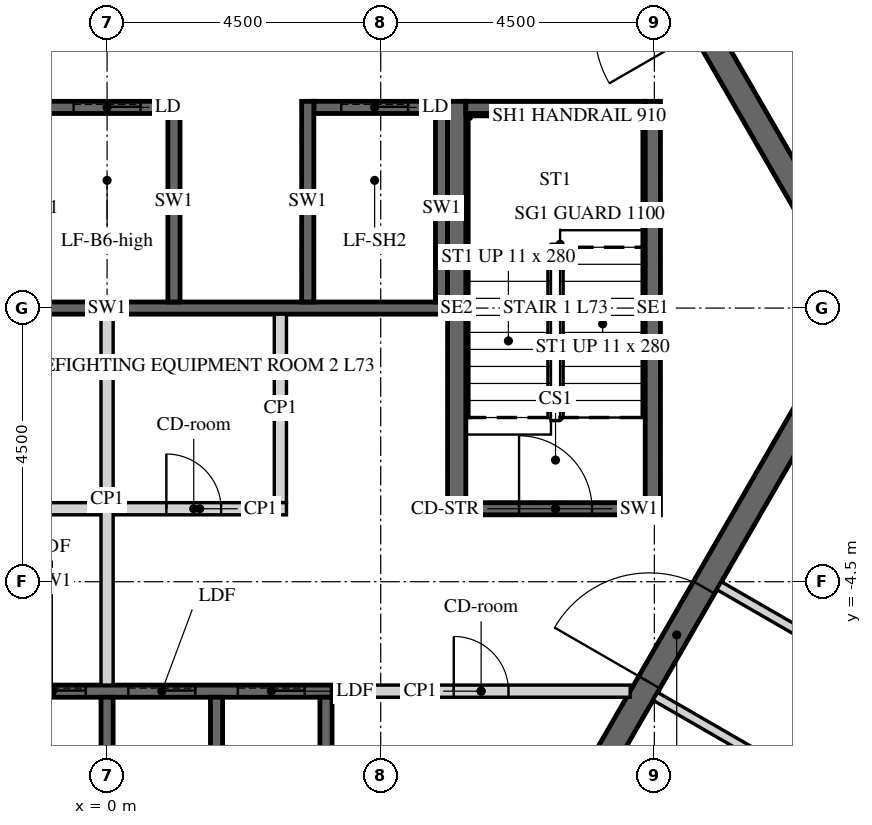
"""IFC4 building model, lengths in metres.
Left out: names, types, materials, properties, quantities, classifications, styles, units other than length and angle.
Written with IfcOpenShell. Run it as: python <this file> out.ifc"""

import sys

from ifc_helpers import new_model, si_unit, direction, frame, frame_2d, origin, place, context, subcontext, project, spatial, polyline, rectangle, outline, extrude, element, fill, save


model = new_model("IFC4")
c1 = context("Model", 3, precision=1e-05, world=origin(), true_north=direction((0.0, 1.0)))
c2 = subcontext(c1, "Body", "Model", "MODEL_VIEW")
j1 = project(units=[si_unit("LENGTHUNIT", "METRE"), si_unit("PLANEANGLEUNIT", "RADIAN")], contexts=[c1])
p1 = place(None, origin())
s1 = spatial("IfcSite", under=j1, at=p1, CompositionType="ELEMENT")
p2 = place(p1, origin())
s2 = spatial("IfcBuilding", under=s1, at=p2, CompositionType="ELEMENT")
p3 = place(p2, frame((0.0, 0.0, 303.0)))
s3 = spatial("IfcBuildingStorey", under=s2, at=p3, CompositionType="ELEMENT", Elevation=303.0)
p4 = place(p3, frame((6.235, -10.8, -0.15), z_axis=(0.0, 0.0, 1.0), x_axis=(0.499996419489, 0.866027470984, 0.0)))
e1 = element("IfcWall", 1, at=p4, inside=s3, PredefinedType="SHEAR", context=c2, shape_type="SweptSolid", body=[
    extrude(outline(polyline([(-0.115, -0.2), (12.586, -0.2), (12.355, 0.2), (0.115, 0.2), (-0.115, -0.2)])), origin(), (0.0, 0.0, 1.0), 3.9),
])
p5 = place(p4, frame((5.364, 0.0, 0.15)))
e2 = element("IfcOpeningElement", 2, at=p5, cuts=e1, PredefinedType="OPENING", context=c2, shape_type="SweptSolid", body=[
    extrude(rectangle(XDim=1.8, YDim=2.4, at=frame_2d((0.9, 1.2))), frame((0.0, 0.21, 0.0), z_axis=(0.0, -1.0, 0.0), x_axis=(1.0, 0.0, 0.0)), (0.0, 0.0, 1.0), 0.42),
])
p6 = place(p3, frame((12.471, 0.0, -0.15), z_axis=(0.0, 0.0, 1.0), x_axis=(-0.499996419489, 0.866027470984, 0.0)))
e3 = element("IfcWall", 3, at=p6, inside=s3, PredefinedType="SHEAR", context=c2, shape_type="SweptSolid", body=[
    extrude(outline(polyline([(-0.115, -0.2), (12.586, -0.2), (12.355, 0.2), (0.115, 0.2), (-0.115, -0.2)])), origin(), (0.0, 0.0, 1.0), 3.9),
])
p7 = place(p6, frame((5.306, 0.0, 0.15)))
e4 = element("IfcOpeningElement", 4, at=p7, cuts=e3, PredefinedType="OPENING", context=c2, shape_type="SweptSolid", body=[
    extrude(rectangle(XDim=1.8, YDim=2.4, at=frame_2d((0.9, 1.2))), frame((0.0, 0.21, 0.0), z_axis=(0.0, -1.0, 0.0), x_axis=(1.0, 0.0, 0.0)), (0.0, 0.0, 1.0), 0.42),
])
p8 = place(p3, frame((-5.6, 3.3, -0.25), z_axis=(0.0, 0.0, 1.0), x_axis=(1.0, 0.0, 0.0)))
e5 = element("IfcWall", 5, at=p8, inside=s3, PredefinedType="SHEAR", context=c2, shape_type="SweptSolid", body=[
    extrude(rectangle(XDim=6.6, YDim=0.2, at=frame_2d((3.3, 0.0))), origin(), (0.0, 0.0, 1.0), 3.9),
])
p9 = place(p8, frame((0.65, 0.0, 0.25)))
e6 = element("IfcOpeningElement", 6, at=p9, cuts=e5, PredefinedType="OPENING", context=c2, shape_type="SweptSolid", body=[
    extrude(rectangle(XDim=1.1, YDim=2.1, at=frame_2d((0.55, 1.05))), frame((0.0, 0.11, 0.0), z_axis=(0.0, -1.0, 0.0), x_axis=(1.0, 0.0, 0.0)), (0.0, 0.0, 1.0), 0.22),
])
p10 = place(p8, frame((2.85, 0.0, 0.25)))
e7 = element("IfcOpeningElement", 7, at=p10, cuts=e5, PredefinedType="OPENING", context=c2, shape_type="SweptSolid", body=[
    extrude(rectangle(XDim=1.1, YDim=2.1, at=frame_2d((0.55, 1.05))), frame((0.0, 0.11, 0.0), z_axis=(0.0, -1.0, 0.0), x_axis=(1.0, 0.0, 0.0)), (0.0, 0.0, 1.0), 0.22),
])
p11 = place(p8, frame((5.05, 0.0, 0.25)))
e8 = element("IfcOpeningElement", 8, at=p11, cuts=e5, PredefinedType="OPENING", context=c2, shape_type="SweptSolid", body=[
    extrude(rectangle(XDim=1.1, YDim=2.1, at=frame_2d((0.55, 1.05))), frame((0.0, 0.11, 0.0), z_axis=(0.0, -1.0, 0.0), x_axis=(1.0, 0.0, 0.0)), (0.0, 0.0, 1.0), 0.22),
])
p12 = place(p3, frame((3.4, 3.3, -0.25), z_axis=(0.0, 0.0, 1.0), x_axis=(1.0, 0.0, 0.0)))
e9 = element("IfcWall", 9, at=p12, inside=s3, PredefinedType="SHEAR", context=c2, shape_type="SweptSolid", body=[
    extrude(rectangle(XDim=2.2, YDim=0.2, at=frame_2d((1.1, 0.0))), origin(), (0.0, 0.0, 1.0), 3.9),
])
p13 = place(p12, frame((0.45, 0.0, 0.25)))
e10 = element("IfcOpeningElement", 10, at=p13, cuts=e9, PredefinedType="OPENING", context=c2, shape_type="SweptSolid", body=[
    extrude(rectangle(XDim=1.1, YDim=2.1, at=frame_2d((0.55, 1.05))), frame((0.0, 0.11, 0.0), z_axis=(0.0, -1.0, 0.0), x_axis=(1.0, 0.0, 0.0)), (0.0, 0.0, 1.0), 0.22),
])
p14 = place(p3, frame((-5.6, 0.0, -0.25), z_axis=(0.0, 0.0, 1.0), x_axis=(1.0, 0.0, 0.0)))
e11 = element("IfcWall", 11, at=p14, inside=s3, PredefinedType="SHEAR", context=c2, shape_type="SweptSolid", body=[
    extrude(rectangle(XDim=11.2, YDim=0.2, at=frame_2d((5.6, 0.0))), origin(), (0.0, 0.0, 1.0), 3.9),
])
for number, where, z_axis, x_axis in (
    (12, (1.1, 0.1, -0.25), (0.0, 0.0, 1.0), (0.0, 1.0, 0.0)),
    (13, (3.3, 0.1, -0.25), (0.0, 0.0, 1.0), (0.0, 1.0, 0.0)),
):
    element("IfcWall", number, at=place(p3, frame(where, z_axis=z_axis, x_axis=x_axis)), inside=s3, PredefinedType="SHEAR", context=c2, shape_type="SweptSolid", body=[
        extrude(rectangle(XDim=3.3, YDim=0.2, at=frame_2d((1.65, 0.0))), origin(), (0.0, 0.0, 1.0), 3.9),
    ])
p15 = place(p3, frame((5.5, 0.1, -0.25), z_axis=(0.0, 0.0, 1.0), x_axis=(0.0, 1.0, 0.0)))
e14 = element("IfcWall", 14, at=p15, inside=s3, PredefinedType="SHEAR", context=c2, shape_type="SweptSolid", body=[
    extrude(rectangle(XDim=3.1, YDim=0.2, at=frame_2d((1.55, 0.0))), origin(), (0.0, 0.0, 1.0), 3.9),
])
p16 = place(p3, frame((-5.5, -6.3, -0.25), z_axis=(0.0, 0.0, 1.0), x_axis=(1.0, 0.0, 0.0)))
e15 = element("IfcWall", 15, at=p16, inside=s3, PredefinedType="SHEAR", context=c2, shape_type="SweptSolid", body=[
    extrude(rectangle(XDim=9.2, YDim=0.2, at=frame_2d((4.6, 0.0))), origin(), (0.0, 0.0, 1.0), 3.9),
])
p17 = place(p16, frame((0.45, 0.0, 0.25)))
e16 = element("IfcOpeningElement", 16, at=p17, cuts=e15, PredefinedType="OPENING", context=c2, shape_type="SweptSolid", body=[
    extrude(rectangle(XDim=1.1, YDim=2.1, at=frame_2d((0.55, 1.05))), frame((0.0, 0.11, 0.0), z_axis=(0.0, -1.0, 0.0), x_axis=(1.0, 0.0, 0.0)), (0.0, 0.0, 1.0), 0.22),
])
p18 = place(p16, frame((2.25, 0.0, 0.25)))
e17 = element("IfcOpeningElement", 17, at=p18, cuts=e15, PredefinedType="OPENING", context=c2, shape_type="SweptSolid", body=[
    extrude(rectangle(XDim=1.1, YDim=2.1, at=frame_2d((0.55, 1.05))), frame((0.0, 0.11, 0.0), z_axis=(0.0, -1.0, 0.0), x_axis=(1.0, 0.0, 0.0)), (0.0, 0.0, 1.0), 0.22),
])
p19 = place(p16, frame((4.05, 0.0, 0.25)))
e18 = element("IfcOpeningElement", 18, at=p19, cuts=e15, PredefinedType="OPENING", context=c2, shape_type="SweptSolid", body=[
    extrude(rectangle(XDim=1.1, YDim=2.1, at=frame_2d((0.55, 1.05))), frame((0.0, 0.11, 0.0), z_axis=(0.0, -1.0, 0.0), x_axis=(1.0, 0.0, 0.0)), (0.0, 0.0, 1.0), 0.22),
])
p20 = place(p16, frame((5.85, 0.0, 0.25)))
e19 = element("IfcOpeningElement", 19, at=p20, cuts=e15, PredefinedType="OPENING", context=c2, shape_type="SweptSolid", body=[
    extrude(rectangle(XDim=1.1, YDim=2.1, at=frame_2d((0.55, 1.05))), frame((0.0, 0.11, 0.0), z_axis=(0.0, -1.0, 0.0), x_axis=(1.0, 0.0, 0.0)), (0.0, 0.0, 1.0), 0.22),
])
p21 = place(p16, frame((7.65, 0.0, 0.25)))
e20 = element("IfcOpeningElement", 20, at=p21, cuts=e15, PredefinedType="OPENING", context=c2, shape_type="SweptSolid", body=[
    extrude(rectangle(XDim=1.1, YDim=2.1, at=frame_2d((0.55, 1.05))), frame((0.0, 0.11, 0.0), z_axis=(0.0, -1.0, 0.0), x_axis=(1.0, 0.0, 0.0)), (0.0, 0.0, 1.0), 0.22),
])
for number, where, z_axis, x_axis in (
    (21, (0.0, -9.3, -0.25), (0.0, 0.0, 1.0), (0.0, 1.0, 0.0)),
    (22, (1.8, -9.3, -0.25), (0.0, 0.0, 1.0), (0.0, 1.0, 0.0)),
    (23, (3.6, -9.3, -0.25), (0.0, 0.0, 1.0), (0.0, 1.0, 0.0)),
):
    element("IfcWall", number, at=place(p3, frame(where, z_axis=z_axis, x_axis=x_axis)), inside=s3, PredefinedType="SHEAR", context=c2, shape_type="SweptSolid", body=[
        extrude(rectangle(XDim=2.9, YDim=0.2, at=frame_2d((1.45, 0.0))), origin(), (0.0, 0.0, 1.0), 3.9),
    ])
p22 = place(p3, frame((-5.6, -3.3, 0.0), z_axis=(0.0, 0.0, 1.0), x_axis=(1.0, 0.0, 0.0)))
e24 = element("IfcWall", 24, at=p22, inside=s3, PredefinedType="PARTITIONING", context=c2, shape_type="SweptSolid", body=[
    extrude(rectangle(XDim=5.5, YDim=0.2, at=frame_2d((2.75, 0.0))), origin(), (0.0, 0.0, 1.0), 3.65),
])
p23 = place(p22, frame((2.3, 0.0, 0.0)))
e25 = element("IfcOpeningElement", 25, at=p23, cuts=e24, PredefinedType="OPENING", context=c2, shape_type="SweptSolid", body=[
    extrude(rectangle(XDim=0.9, YDim=2.1, at=frame_2d((0.45, 1.05))), frame((0.0, 0.11, 0.0), z_axis=(0.0, -1.0, 0.0), x_axis=(1.0, 0.0, 0.0)), (0.0, 0.0, 1.0), 0.22),
])
p24 = place(p3, frame((0.1, -3.3, 0.0), z_axis=(0.0, 0.0, 1.0), x_axis=(1.0, 0.0, 0.0)))
e26 = element("IfcWall", 26, at=p24, inside=s3, PredefinedType="PARTITIONING", context=c2, shape_type="SweptSolid", body=[
    extrude(rectangle(XDim=2.85, YDim=0.2, at=frame_2d((1.425, 0.0))), origin(), (0.0, 0.0, 1.0), 3.65),
])
p25 = place(p24, frame((0.875, 0.0, 0.0)))
e27 = element("IfcOpeningElement", 27, at=p25, cuts=e26, PredefinedType="OPENING", context=c2, shape_type="SweptSolid", body=[
    extrude(rectangle(XDim=0.9, YDim=2.1, at=frame_2d((0.45, 1.05))), frame((0.0, 0.11, 0.0), z_axis=(0.0, -1.0, 0.0), x_axis=(1.0, 0.0, 0.0)), (0.0, 0.0, 1.0), 0.22),
])
p26 = place(p3, frame((2.85, -3.2, 0.0), z_axis=(0.0, 0.0, 1.0), x_axis=(0.0, 1.0, 0.0)))
e28 = element("IfcWall", 28, at=p26, inside=s3, PredefinedType="PARTITIONING", context=c2, shape_type="SweptSolid", body=[
    extrude(rectangle(XDim=3.1, YDim=0.2, at=frame_2d((1.55, 0.0))), origin(), (0.0, 0.0, 1.0), 3.65),
])
p27 = place(p3, frame((0.0, -6.2, 0.0), z_axis=(0.0, 0.0, 1.0), x_axis=(0.0, 1.0, 0.0)))
e29 = element("IfcWall", 29, at=p27, inside=s3, PredefinedType="PARTITIONING", context=c2, shape_type="SweptSolid", body=[
    extrude(rectangle(XDim=6.1, YDim=0.2, at=frame_2d((3.05, 0.0))), origin(), (0.0, 0.0, 1.0), 3.65),
])
p28 = place(p3, frame((3.7, -6.3, 0.0), z_axis=(0.0, 0.0, 1.0), x_axis=(1.0, 0.0, 0.0)))
e30 = element("IfcWall", 30, at=p28, inside=s3, PredefinedType="PARTITIONING", context=c2, shape_type="SweptSolid", body=[
    extrude(rectangle(XDim=4.903, YDim=0.2, at=frame_2d((2.451, 0.0))), origin(), (0.0, 0.0, 1.0), 3.65),
])
p29 = place(p28, frame((2.001, 0.0, 0.0)))
e31 = element("IfcOpeningElement", 31, at=p29, cuts=e30, PredefinedType="OPENING", context=c2, shape_type="SweptSolid", body=[
    extrude(rectangle(XDim=0.9, YDim=2.1, at=frame_2d((0.45, 1.05))), frame((0.0, 0.11, 0.0), z_axis=(0.0, -1.0, 0.0), x_axis=(1.0, 0.0, 0.0)), (0.0, 0.0, 1.0), 0.22),
])
p30 = place(p3, frame((5.75, -3.4, -0.25), z_axis=(0.0, 0.0, 1.0), x_axis=(0.0, 1.0, 0.0)))
e32 = element("IfcWall", 32, at=p30, inside=s3, PredefinedType="SHEAR", context=c2, shape_type="SweptSolid", body=[
    extrude(rectangle(XDim=6.8, YDim=0.3, at=frame_2d((3.4, 0.0))), origin(), (0.0, 0.0, 1.0), 3.9),
])
p31 = place(p3, frame((8.975, -3.4, -0.25), z_axis=(0.0, 0.0, 1.0), x_axis=(0.0, 1.0, 0.0)))
e33 = element("IfcWall", 33, at=p31, inside=s3, PredefinedType="SHEAR", context=c2, shape_type="SweptSolid", body=[
    extrude(rectangle(XDim=6.8, YDim=0.25, at=frame_2d((3.4, 0.0))), origin(), (0.0, 0.0, 1.0), 3.9),
])
p32 = place(p3, frame((5.9, 3.3, -0.25), z_axis=(0.0, 0.0, 1.0), x_axis=(1.0, 0.0, 0.0)))
e34 = element("IfcWall", 34, at=p32, inside=s3, PredefinedType="SHEAR", context=c2, shape_type="SweptSolid", body=[
    extrude(rectangle(XDim=2.95, YDim=0.2, at=frame_2d((1.475, 0.0))), origin(), (0.0, 0.0, 1.0), 3.9),
])
p33 = place(p3, frame((5.9, -3.3, -0.25), z_axis=(0.0, 0.0, 1.0), x_axis=(1.0, 0.0, 0.0)))
e35 = element("IfcWall", 35, at=p33, inside=s3, PredefinedType="SHEAR", context=c2, shape_type="SweptSolid", body=[
    extrude(rectangle(XDim=2.95, YDim=0.2, at=frame_2d((1.475, 0.0))), origin(), (0.0, 0.0, 1.0), 3.9),
])
p34 = place(p33, frame((0.875, 0.0, 0.25)))
e36 = element("IfcOpeningElement", 36, at=p34, cuts=e35, PredefinedType="OPENING", context=c2, shape_type="SweptSolid", body=[
    extrude(rectangle(XDim=1.2, YDim=2.4, at=frame_2d((0.6, 1.2))), frame((0.0, 0.11, 0.0), z_axis=(0.0, -1.0, 0.0), x_axis=(1.0, 0.0, 0.0)), (0.0, 0.0, 1.0), 0.22),
])
p35 = place(p3, frame((18.875, -1.158, 0.0), z_axis=(0.0, 0.0, 1.0), x_axis=(-0.55919880344, 0.829033592945, 0.0)))
e37 = element("IfcWall", 37, at=p35, inside=s3, PredefinedType="PARTITIONING", context=c2, shape_type="SweptSolid", body=[
    extrude(rectangle(XDim=16.939, YDim=0.15, at=frame_2d((8.47, 0.0))), origin(), (0.0, 0.0, 1.0), 2.988),
])
p36 = place(p35, frame((4.09, 0.0, 0.0)))
e38 = element("IfcOpeningElement", 38, at=p36, cuts=e37, PredefinedType="OPENING", context=c2, shape_type="SweptSolid", body=[
    extrude(rectangle(XDim=1.0, YDim=2.1, at=frame_2d((0.5, 1.05))), frame((0.0, 0.085, 0.0), z_axis=(0.0, -1.0, 0.0), x_axis=(1.0, 0.0, 0.0)), (0.0, 0.0, 1.0), 0.17),
])
p37 = place(p35, frame((15.39, 0.0, 0.0)))
e39 = element("IfcOpeningElement", 39, at=p37, cuts=e37, PredefinedType="OPENING", context=c2, shape_type="SweptSolid", body=[
    extrude(rectangle(XDim=1.0, YDim=2.1, at=frame_2d((0.5, 1.05))), frame((0.0, 0.085, 0.0), z_axis=(0.0, -1.0, 0.0), x_axis=(1.0, 0.0, 0.0)), (0.0, 0.0, 1.0), 0.17),
])
p38 = place(p3, frame((13.898, -6.778, 0.0), z_axis=(0.0, 0.0, 1.0), x_axis=(-0.866041342403, 0.499972392486, 0.0)))
e40 = element("IfcWall", 40, at=p38, inside=s3, PredefinedType="PARTITIONING", context=c2, shape_type="SweptSolid", body=[
    extrude(rectangle(XDim=4.425, YDim=0.15, at=frame_2d((2.212, 0.0))), origin(), (0.0, 0.0, 1.0), 2.988),
])
p39 = place(p3, frame((9.016, -6.384, 0.0), z_axis=(0.0, 0.0, 1.0), x_axis=(0.866031096941, -0.499990139034, 0.0)))
e41 = element("IfcWall", 41, at=p39, inside=s3, PredefinedType="PARTITIONING", context=c2, shape_type="SweptSolid", body=[
    extrude(rectangle(XDim=4.5, YDim=0.15, at=frame_2d((2.25, 0.0))), origin(), (0.0, 0.0, 1.0), 2.988),
])
p40 = place(p5, origin())
e42 = element("IfcDoor", 42, at=p40, inside=s3, OperationType="DOUBLE_DOOR_SINGLE_SWING", PredefinedType="DOOR", context=c2, shape_type="SweptSolid", body=[
    extrude(rectangle(XDim=1.8, YDim=2.4, at=frame_2d((0.9, 1.2))), frame((0.0, 0.025, 0.0), z_axis=(0.0, -1.0, 0.0), x_axis=(1.0, 0.0, 0.0)), (0.0, 0.0, 1.0), 0.05),
])
fill(e2, e42)
p41 = place(p25, origin())
e43 = element("IfcDoor", 43, at=p41, inside=s3, OperationType="SINGLE_SWING_LEFT", PredefinedType="DOOR", context=c2, shape_type="SweptSolid", body=[
    extrude(rectangle(XDim=0.9, YDim=2.1, at=frame_2d((0.45, 1.05))), frame((0.0, 0.025, 0.0), z_axis=(0.0, -1.0, 0.0), x_axis=(1.0, 0.0, 0.0)), (0.0, 0.0, 1.0), 0.05),
])
fill(e27, e43)
p42 = place(p29, origin())
e44 = element("IfcDoor", 44, at=p42, inside=s3, OperationType="SINGLE_SWING_LEFT", PredefinedType="DOOR", context=c2, shape_type="SweptSolid", body=[
    extrude(rectangle(XDim=0.9, YDim=2.1, at=frame_2d((0.45, 1.05))), frame((0.0, 0.025, 0.0), z_axis=(0.0, -1.0, 0.0), x_axis=(1.0, 0.0, 0.0)), (0.0, 0.0, 1.0), 0.05),
])
fill(e31, e44)
p43 = place(p34, origin())
e45 = element("IfcDoor", 45, at=p43, inside=s3, OperationType="SINGLE_SWING_LEFT", PredefinedType="DOOR", context=c2, shape_type="SweptSolid", body=[
    extrude(rectangle(XDim=1.2, YDim=2.4, at=frame_2d((0.6, 1.2))), frame((0.0, 0.025, 0.0), z_axis=(0.0, -1.0, 0.0), x_axis=(1.0, 0.0, 0.0)), (0.0, 0.0, 1.0), 0.05),
])
fill(e36, e45)
p44 = place(p11, origin())
e46 = element("IfcDoor", 46, at=p44, inside=s3, OperationType="SLIDING_TO_LEFT", PredefinedType="DOOR", context=c2, shape_type="SweptSolid", body=[
    extrude(rectangle(XDim=1.1, YDim=2.1, at=frame_2d((0.55, 1.05))), frame((0.0, 0.025, 0.0), z_axis=(0.0, -1.0, 0.0), x_axis=(1.0, 0.0, 0.0)), (0.0, 0.0, 1.0), 0.05),
])
fill(e8, e46)
p45 = place(p13, origin())
e47 = element("IfcDoor", 47, at=p45, inside=s3, OperationType="SLIDING_TO_LEFT", PredefinedType="DOOR", context=c2, shape_type="SweptSolid", body=[
    extrude(rectangle(XDim=1.1, YDim=2.1, at=frame_2d((0.55, 1.05))), frame((0.0, 0.025, 0.0), z_axis=(0.0, -1.0, 0.0), x_axis=(1.0, 0.0, 0.0)), (0.0, 0.0, 1.0), 0.05),
])
fill(e10, e47)
p46 = place(p19, origin())
e48 = element("IfcDoor", 48, at=p46, inside=s3, OperationType="SLIDING_TO_LEFT", PredefinedType="DOOR", context=c2, shape_type="SweptSolid", body=[
    extrude(rectangle(XDim=1.1, YDim=2.1, at=frame_2d((0.55, 1.05))), frame((0.0, 0.025, 0.0), z_axis=(0.0, -1.0, 0.0), x_axis=(1.0, 0.0, 0.0)), (0.0, 0.0, 1.0), 0.05),
])
fill(e18, e48)
p47 = place(p20, origin())
e49 = element("IfcDoor", 49, at=p47, inside=s3, OperationType="SLIDING_TO_LEFT", PredefinedType="DOOR", context=c2, shape_type="SweptSolid", body=[
    extrude(rectangle(XDim=1.1, YDim=2.1, at=frame_2d((0.55, 1.05))), frame((0.0, 0.025, 0.0), z_axis=(0.0, -1.0, 0.0), x_axis=(1.0, 0.0, 0.0)), (0.0, 0.0, 1.0), 0.05),
])
fill(e19, e49)
p48 = place(p21, origin())
e50 = element("IfcDoor", 50, at=p48, inside=s3, OperationType="SLIDING_TO_LEFT", PredefinedType="DOOR", context=c2, shape_type="SweptSolid", body=[
    extrude(rectangle(XDim=1.1, YDim=2.1, at=frame_2d((0.55, 1.05))), frame((0.0, 0.025, 0.0), z_axis=(0.0, -1.0, 0.0), x_axis=(1.0, 0.0, 0.0)), (0.0, 0.0, 1.0), 0.05),
])
fill(e20, e50)
save(model, sys.argv[1])
